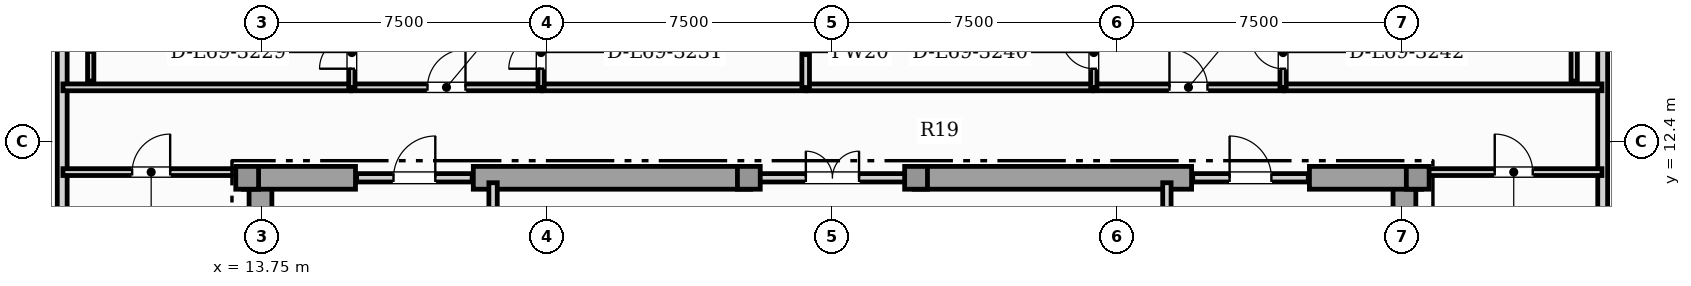
"""IFC4 building model, lengths in metres.
Left out: names, types, materials, properties, quantities, classifications, styles, units other than length and angle.
Written with IfcOpenShell. Run it as: python <this file> out.ifc"""

import sys

from ifc_helpers import new_model, si_unit, direction, frame, frame_2d, origin, origin_2d, place, context, subcontext, project, spatial, rectangle, extrude, element, fill, save


model = new_model("IFC4")
c1 = context("Model", 3, precision=1e-05, world=origin(), true_north=direction((0.0, 1.0)))
c2 = subcontext(c1, "Body", "Model", "MODEL_VIEW")
j1 = project(units=[si_unit("LENGTHUNIT", "METRE"), si_unit("PLANEANGLEUNIT", "RADIAN")], contexts=[c1])
p1 = place(None, origin())
s1 = spatial("IfcSite", under=j1, at=p1, CompositionType="ELEMENT")
p2 = place(p1, origin())
s2 = spatial("IfcBuilding", under=s1, at=p2, CompositionType="ELEMENT")
p3 = place(p2, frame((0.0, 0.0, 281.05)))
s3 = spatial("IfcBuildingStorey", under=s2, at=p3, CompositionType="ELEMENT", Elevation=281.05)
for number, where, z_axis, x_axis in (
    (1, (13.7, 0.92, 0.0), (0.0, 0.0, 1.0), (0.0, 1.0, 0.0)),
    (2, (43.8, 0.92, 0.0), (0.0, 0.0, 1.0), (0.0, 1.0, 0.0)),
):
    element("IfcWall", number, at=place(p3, frame(where, z_axis=z_axis, x_axis=x_axis)), inside=s3, PredefinedType="SHEAR", context=c2, shape_type="SweptSolid", body=[
        extrude(rectangle(XDim=10.53, YDim=0.6, at=frame_2d((5.265, 0.0))), origin(), (0.0, 0.0, 1.0), 3.65),
    ])
p4 = place(p3, frame((13.25, 11.45, 0.0), z_axis=(0.0, 0.0, 1.0), x_axis=(1.0, 0.0, 0.0)))
e3 = element("IfcWall", 3, at=p4, inside=s3, PredefinedType="SHEAR", context=c2, shape_type="SweptSolid", body=[
    extrude(rectangle(XDim=2.95, YDim=0.6, at=frame_2d((1.475, 0.0))), origin(), (0.0, 0.0, 1.0), 3.65),
])
for number, where, z_axis, x_axis in (
    (4, (19.3, 11.45, 0.0), (0.0, 0.0, 1.0), (1.0, 0.0, 0.0)),
    (5, (30.9, 11.45, 0.0), (0.0, 0.0, 1.0), (1.0, 0.0, 0.0)),
):
    element("IfcWall", number, at=place(p3, frame(where, z_axis=z_axis, x_axis=x_axis)), inside=s3, PredefinedType="SHEAR", context=c2, shape_type="SweptSolid", body=[
        extrude(rectangle(XDim=7.3, YDim=0.6, at=frame_2d((3.65, 0.0))), origin(), (0.0, 0.0, 1.0), 3.65),
    ])
p5 = place(p3, frame((41.3, 11.45, 0.0), z_axis=(0.0, 0.0, 1.0), x_axis=(1.0, 0.0, 0.0)))
e6 = element("IfcWall", 6, at=p5, inside=s3, PredefinedType="SHEAR", context=c2, shape_type="SweptSolid", body=[
    extrude(rectangle(XDim=2.95, YDim=0.6, at=frame_2d((1.475, 0.0))), origin(), (0.0, 0.0, 1.0), 3.65),
])
for number, where, z_axis, x_axis in (
    (7, (13.35, 11.45, 0.0), (0.0, 0.0, 1.0), (1.0, 0.0, 0.0)),
    (8, (44.15, 11.45, 0.0), (0.0, 0.0, 1.0), (1.0, 0.0, 0.0)),
    (9, (26.55, 11.45, 0.0), (0.0, 0.0, 1.0), (1.0, 0.0, 0.0)),
    (10, (30.95, 11.45, 0.0), (0.0, 0.0, 1.0), (1.0, 0.0, 0.0)),
):
    element("IfcColumn", number, at=place(p3, frame(where, z_axis=z_axis, x_axis=x_axis)), inside=s3, PredefinedType="COLUMN", context=c2, shape_type="SweptSolid", body=[
        extrude(rectangle(XDim=0.6, YDim=0.6, at=origin_2d()), origin(), (0.0, 0.0, 1.0), 3.85),
    ])
p6 = place(p3, frame((49.017, 3.24, 0.0), z_axis=(0.0, 0.0, 1.0), x_axis=(0.0, 1.0, 0.0)))
e11 = element("IfcWall", 11, at=p6, inside=s3, PredefinedType="SOLIDWALL", context=c2, shape_type="SweptSolid", body=[
    extrude(rectangle(XDim=14.836, YDim=0.26, at=frame_2d((7.418, 0.0))), origin(), (0.0, 0.0, 1.0), 3.65),
])
p7 = place(p3, frame((8.483, 18.076, 0.0), z_axis=(0.0, 0.0, 1.0), x_axis=(0.0, -1.0, 0.0)))
e12 = element("IfcWall", 12, at=p7, inside=s3, PredefinedType="SOLIDWALL", context=c2, shape_type="SweptSolid", body=[
    extrude(rectangle(XDim=14.836, YDim=0.26, at=frame_2d((7.418, 0.0))), origin(), (0.0, 0.0, 1.0), 3.65),
])
p8 = place(p7, frame((8.936, 0.0, 0.85)))
e13 = element("IfcOpeningElement", 13, at=p8, cuts=e12, PredefinedType="OPENING", context=c2, shape_type="SweptSolid", body=[
    extrude(rectangle(XDim=2.1, YDim=2.05, at=frame_2d((1.05, 1.025))), frame((0.0, 0.14, 0.0), z_axis=(0.0, -1.0, 0.0), x_axis=(1.0, 0.0, 0.0)), (0.0, 0.0, 1.0), 0.28),
])
p9 = place(p3, frame((19.82, 8.52, 0.0), z_axis=(0.0, 0.0, 1.0), x_axis=(0.0, 1.0, 0.0)))
e14 = element("IfcWall", 14, at=p9, inside=s3, PredefinedType="SOLIDWALL", context=c2, shape_type="SweptSolid", body=[
    extrude(rectangle(XDim=2.8, YDim=0.22, at=frame_2d((1.4, 0.0))), origin(), (0.0, 0.0, 1.0), 3.105),
])
p10 = place(p9, frame((0.85, 0.0, 0.0)))
e15 = element("IfcOpeningElement", 15, at=p10, cuts=e14, PredefinedType="OPENING", context=c2, shape_type="SweptSolid", body=[
    extrude(rectangle(XDim=1.1, YDim=2.2, at=frame_2d((0.55, 1.1))), frame((0.0, 0.12, 0.0), z_axis=(0.0, -1.0, 0.0), x_axis=(1.0, 0.0, 0.0)), (0.0, 0.0, 1.0), 0.24),
])
p11 = place(p3, frame((37.55, 8.52, 0.0), z_axis=(0.0, 0.0, 1.0), x_axis=(0.0, 1.0, 0.0)))
e16 = element("IfcWall", 16, at=p11, inside=s3, PredefinedType="SOLIDWALL", context=c2, shape_type="SweptSolid", body=[
    extrude(rectangle(XDim=2.8, YDim=0.22, at=frame_2d((1.4, 0.0))), origin(), (0.0, 0.0, 1.0), 3.105),
])
p12 = place(p11, frame((0.85, 0.0, 0.0)))
e17 = element("IfcOpeningElement", 17, at=p12, cuts=e16, PredefinedType="OPENING", context=c2, shape_type="SweptSolid", body=[
    extrude(rectangle(XDim=1.1, YDim=2.2, at=frame_2d((0.55, 1.1))), frame((0.0, 0.12, 0.0), z_axis=(0.0, -1.0, 0.0), x_axis=(1.0, 0.0, 0.0)), (0.0, 0.0, 1.0), 0.24),
])
p13 = place(p3, frame((16.23, 11.45, 0.0), z_axis=(0.0, 0.0, 1.0), x_axis=(1.0, 0.0, 0.0)))
e18 = element("IfcWall", 18, at=p13, inside=s3, PredefinedType="SOLIDWALL", context=c2, shape_type="SweptSolid", body=[
    extrude(rectangle(XDim=3.04, YDim=0.22, at=frame_2d((1.52, 0.0))), origin(), (0.0, 0.0, 1.0), 3.65),
])
p14 = place(p13, frame((0.97, 0.0, 0.0)))
e19 = element("IfcOpeningElement", 19, at=p14, cuts=e18, PredefinedType="OPENING", context=c2, shape_type="SweptSolid", body=[
    extrude(rectangle(XDim=1.1, YDim=2.2, at=frame_2d((0.55, 1.1))), frame((0.0, 0.12, 0.0), z_axis=(0.0, -1.0, 0.0), x_axis=(1.0, 0.0, 0.0)), (0.0, 0.0, 1.0), 0.24),
])
p15 = place(p3, frame((26.63, 11.45, 0.0), z_axis=(0.0, 0.0, 1.0), x_axis=(1.0, 0.0, 0.0)))
e20 = element("IfcWall", 20, at=p15, inside=s3, PredefinedType="SOLIDWALL", context=c2, shape_type="SweptSolid", body=[
    extrude(rectangle(XDim=4.24, YDim=0.22, at=frame_2d((2.12, 0.0))), origin(), (0.0, 0.0, 1.0), 3.65),
])
p16 = place(p15, frame((1.42, 0.0, 0.0)))
e21 = element("IfcOpeningElement", 21, at=p16, cuts=e20, PredefinedType="OPENING", context=c2, shape_type="SweptSolid", body=[
    extrude(rectangle(XDim=1.4, YDim=2.2, at=frame_2d((0.7, 1.1))), frame((0.0, 0.12, 0.0), z_axis=(0.0, -1.0, 0.0), x_axis=(1.0, 0.0, 0.0)), (0.0, 0.0, 1.0), 0.24),
])
p17 = place(p3, frame((38.23, 11.45, 0.0), z_axis=(0.0, 0.0, 1.0), x_axis=(1.0, 0.0, 0.0)))
e22 = element("IfcWall", 22, at=p17, inside=s3, PredefinedType="SOLIDWALL", context=c2, shape_type="SweptSolid", body=[
    extrude(rectangle(XDim=3.04, YDim=0.22, at=frame_2d((1.52, 0.0))), origin(), (0.0, 0.0, 1.0), 3.65),
])
p18 = place(p17, frame((0.97, 0.0, 0.0)))
e23 = element("IfcOpeningElement", 23, at=p18, cuts=e22, PredefinedType="OPENING", context=c2, shape_type="SweptSolid", body=[
    extrude(rectangle(XDim=1.1, YDim=2.2, at=frame_2d((0.55, 1.1))), frame((0.0, 0.12, 0.0), z_axis=(0.0, -1.0, 0.0), x_axis=(1.0, 0.0, 0.0)), (0.0, 0.0, 1.0), 0.24),
])
p19 = place(p3, frame((8.503, 11.6, 0.0), z_axis=(0.0, 0.0, 1.0), x_axis=(1.0, 0.0, 0.0)))
e24 = element("IfcWall", 24, at=p19, inside=s3, PredefinedType="PARTITIONING", context=c2, shape_type="SweptSolid", body=[
    extrude(rectangle(XDim=4.642, YDim=0.18, at=frame_2d((2.321, 0.0))), origin(), (0.0, 0.0, 1.0), 3.65),
])
p20 = place(p19, frame((1.821, 0.0, 0.0)))
e25 = element("IfcOpeningElement", 25, at=p20, cuts=e24, PredefinedType="OPENING", context=c2, shape_type="SweptSolid", body=[
    extrude(rectangle(XDim=1.0, YDim=2.15, at=frame_2d((0.5, 1.075))), frame((0.0, 0.1, 0.0), z_axis=(0.0, -1.0, 0.0), x_axis=(1.0, 0.0, 0.0)), (0.0, 0.0, 1.0), 0.2),
])
p21 = place(p3, frame((44.355, 11.6, 0.0), z_axis=(0.0, 0.0, 1.0), x_axis=(1.0, 0.0, 0.0)))
e26 = element("IfcWall", 26, at=p21, inside=s3, PredefinedType="PARTITIONING", context=c2, shape_type="SweptSolid", body=[
    extrude(rectangle(XDim=4.642, YDim=0.18, at=frame_2d((2.321, 0.0))), origin(), (0.0, 0.0, 1.0), 3.65),
])
p22 = place(p21, frame((1.821, 0.0, 0.0)))
e27 = element("IfcOpeningElement", 27, at=p22, cuts=e26, PredefinedType="OPENING", context=c2, shape_type="SweptSolid", body=[
    extrude(rectangle(XDim=1.0, YDim=2.15, at=frame_2d((0.5, 1.075))), frame((0.0, 0.1, 0.0), z_axis=(0.0, -1.0, 0.0), x_axis=(1.0, 0.0, 0.0)), (0.0, 0.0, 1.0), 0.2),
])
p23 = place(p3, frame((16.099, 13.83, 0.0), z_axis=(0.0, 0.0, 1.0), x_axis=(1.0, 0.0, 0.0)))
e28 = element("IfcWall", 28, at=p23, inside=s3, PredefinedType="PARTITIONING", context=c2, shape_type="SweptSolid", body=[
    extrude(rectangle(XDim=4.99, YDim=0.18, at=frame_2d((2.495, 0.0))), origin(), (0.0, 0.0, 1.0), 3.65),
])
p24 = place(p23, frame((1.995, 0.0, 0.0)))
e29 = element("IfcOpeningElement", 29, at=p24, cuts=e28, PredefinedType="OPENING", context=c2, shape_type="SweptSolid", body=[
    extrude(rectangle(XDim=1.0, YDim=2.15, at=frame_2d((0.5, 1.075))), frame((0.0, 0.1, 0.0), z_axis=(0.0, -1.0, 0.0), x_axis=(1.0, 0.0, 0.0)), (0.0, 0.0, 1.0), 0.2),
])
p25 = place(p3, frame((8.503, 13.83, 0.0), z_axis=(0.0, 0.0, 1.0), x_axis=(1.0, 0.0, 0.0)))
e30 = element("IfcWall", 30, at=p25, inside=s3, PredefinedType="PARTITIONING", context=c2, shape_type="SweptSolid", body=[
    extrude(rectangle(XDim=7.567, YDim=0.18, at=frame_2d((3.783, 0.0))), origin(), (0.0, 0.0, 1.0), 3.65),
])
p26 = place(p3, frame((21.119, 13.83, 0.0), z_axis=(0.0, 0.0, 1.0), x_axis=(1.0, 0.0, 0.0)))
e31 = element("IfcWall", 31, at=p26, inside=s3, PredefinedType="PARTITIONING", context=c2, shape_type="SweptSolid", body=[
    extrude(rectangle(XDim=6.931, YDim=0.18, at=frame_2d((3.465, 0.0))), origin(), (0.0, 0.0, 1.0), 3.65),
])
p27 = place(p3, frame((35.622, 13.83, 0.0), z_axis=(0.0, 0.0, 1.0), x_axis=(1.0, 0.0, 0.0)))
e32 = element("IfcWall", 32, at=p27, inside=s3, PredefinedType="PARTITIONING", context=c2, shape_type="SweptSolid", body=[
    extrude(rectangle(XDim=4.99, YDim=0.18, at=frame_2d((2.495, 0.0))), origin(), (0.0, 0.0, 1.0), 3.65),
])
p28 = place(p27, frame((1.995, 0.0, 0.0)))
e33 = element("IfcOpeningElement", 33, at=p28, cuts=e32, PredefinedType="OPENING", context=c2, shape_type="SweptSolid", body=[
    extrude(rectangle(XDim=1.0, YDim=2.15, at=frame_2d((0.5, 1.075))), frame((0.0, 0.1, 0.0), z_axis=(0.0, -1.0, 0.0), x_axis=(1.0, 0.0, 0.0)), (0.0, 0.0, 1.0), 0.2),
])
p29 = place(p3, frame((28.08, 13.83, 0.0), z_axis=(0.0, 0.0, 1.0), x_axis=(1.0, 0.0, 0.0)))
e34 = element("IfcWall", 34, at=p29, inside=s3, PredefinedType="PARTITIONING", context=c2, shape_type="SweptSolid", body=[
    extrude(rectangle(XDim=7.512, YDim=0.18, at=frame_2d((3.756, 0.0))), origin(), (0.0, 0.0, 1.0), 3.65),
])
p30 = place(p3, frame((40.642, 13.83, 0.0), z_axis=(0.0, 0.0, 1.0), x_axis=(1.0, 0.0, 0.0)))
e35 = element("IfcWall", 35, at=p30, inside=s3, PredefinedType="PARTITIONING", context=c2, shape_type="SweptSolid", body=[
    extrude(rectangle(XDim=8.355, YDim=0.18, at=frame_2d((4.177, 0.0))), origin(), (0.0, 0.0, 1.0), 3.65),
])
p31 = place(p3, frame((16.104, 13.825, 0.0), z_axis=(0.0, 0.0, 1.0), x_axis=(0.0, 1.0, 0.0)))
e36 = element("IfcWall", 36, at=p31, inside=s3, PredefinedType="PLUMBINGWALL", context=c2, shape_type="SweptSolid", body=[
    extrude(rectangle(XDim=1.84, YDim=0.165, at=frame_2d((0.92, 0.0))), origin(), (0.0, 0.0, 1.0), 3.65),
])
p32 = place(p31, frame((0.495, 0.0, 0.0)))
e37 = element("IfcOpeningElement", 37, at=p32, cuts=e36, PredefinedType="OPENING", context=c2, shape_type="SweptSolid", body=[
    extrude(rectangle(XDim=0.85, YDim=2.1, at=frame_2d((0.425, 1.05))), frame((0.0, 0.093, 0.0), z_axis=(0.0, -1.0, 0.0), x_axis=(1.0, 0.0, 0.0)), (0.0, 0.0, 1.0), 0.185),
])
p33 = place(p3, frame((21.084, 13.825, 0.0), z_axis=(0.0, 0.0, 1.0), x_axis=(0.0, 1.0, 0.0)))
e38 = element("IfcWall", 38, at=p33, inside=s3, PredefinedType="PLUMBINGWALL", context=c2, shape_type="SweptSolid", body=[
    extrude(rectangle(XDim=1.84, YDim=0.165, at=frame_2d((0.92, 0.0))), origin(), (0.0, 0.0, 1.0), 3.295),
])
p34 = place(p33, frame((0.495, 0.0, 0.0)))
e39 = element("IfcOpeningElement", 39, at=p34, cuts=e38, PredefinedType="OPENING", context=c2, shape_type="SweptSolid", body=[
    extrude(rectangle(XDim=0.85, YDim=2.1, at=frame_2d((0.425, 1.05))), frame((0.0, 0.093, 0.0), z_axis=(0.0, -1.0, 0.0), x_axis=(1.0, 0.0, 0.0)), (0.0, 0.0, 1.0), 0.185),
])
p35 = place(p3, frame((28.045, 13.825, 0.0), z_axis=(0.0, 0.0, 1.0), x_axis=(0.0, 1.0, 0.0)))
e40 = element("IfcWall", 40, at=p35, inside=s3, PredefinedType="PARTITIONING", context=c2, shape_type="SweptSolid", body=[
    extrude(rectangle(XDim=1.84, YDim=0.2, at=frame_2d((0.92, 0.0))), origin(), (0.0, 0.0, 1.0), 3.65),
])
p36 = place(p3, frame((35.627, 13.825, 0.0), z_axis=(0.0, 0.0, 1.0), x_axis=(0.0, 1.0, 0.0)))
e41 = element("IfcWall", 41, at=p36, inside=s3, PredefinedType="PLUMBINGWALL", context=c2, shape_type="SweptSolid", body=[
    extrude(rectangle(XDim=1.84, YDim=0.165, at=frame_2d((0.92, 0.0))), origin(), (0.0, 0.0, 1.0), 3.65),
])
p37 = place(p36, frame((0.495, 0.0, 0.0)))
e42 = element("IfcOpeningElement", 42, at=p37, cuts=e41, PredefinedType="OPENING", context=c2, shape_type="SweptSolid", body=[
    extrude(rectangle(XDim=0.85, YDim=2.1, at=frame_2d((0.425, 1.05))), frame((0.0, 0.093, 0.0), z_axis=(0.0, -1.0, 0.0), x_axis=(1.0, 0.0, 0.0)), (0.0, 0.0, 1.0), 0.185),
])
p38 = place(p3, frame((40.607, 13.825, 0.0), z_axis=(0.0, 0.0, 1.0), x_axis=(0.0, 1.0, 0.0)))
e43 = element("IfcWall", 43, at=p38, inside=s3, PredefinedType="PLUMBINGWALL", context=c2, shape_type="SweptSolid", body=[
    extrude(rectangle(XDim=1.84, YDim=0.165, at=frame_2d((0.92, 0.0))), origin(), (0.0, 0.0, 1.0), 3.65),
])
p39 = place(p38, frame((0.495, 0.0, 0.0)))
e44 = element("IfcOpeningElement", 44, at=p39, cuts=e43, PredefinedType="OPENING", context=c2, shape_type="SweptSolid", body=[
    extrude(rectangle(XDim=0.85, YDim=2.1, at=frame_2d((0.425, 1.05))), frame((0.0, 0.093, 0.0), z_axis=(0.0, -1.0, 0.0), x_axis=(1.0, 0.0, 0.0)), (0.0, 0.0, 1.0), 0.185),
])
p40 = place(p3, frame((9.233, 13.995, 0.0), z_axis=(0.0, 0.0, 1.0), x_axis=(0.0, 1.0, 0.0)))
e45 = element("IfcWall", 45, at=p40, inside=s3, PredefinedType="PLUMBINGWALL", context=c2, shape_type="SweptSolid", body=[
    extrude(rectangle(XDim=1.67, YDim=0.165, at=frame_2d((0.835, 0.0))), origin(), (0.0, 0.0, 1.0), 3.65),
])
p41 = place(p3, frame((48.267, 15.495, 0.0), z_axis=(0.0, 0.0, 1.0), x_axis=(0.0, -1.0, 0.0)))
e46 = element("IfcWall", 46, at=p41, inside=s3, PredefinedType="PLUMBINGWALL", context=c2, shape_type="SweptSolid", body=[
    extrude(rectangle(XDim=1.5, YDim=0.165, at=frame_2d((0.75, 0.0))), origin(), (0.0, 0.0, 1.0), 3.65),
])
p42 = place(p14, origin())
e47 = element("IfcDoor", 47, at=p42, inside=s3, OperationType="SINGLE_SWING_RIGHT", PredefinedType="DOOR", context=c2, shape_type="SweptSolid", body=[
    extrude(rectangle(XDim=1.1, YDim=2.2, at=frame_2d((0.55, 1.1))), frame((0.0, 0.025, 0.0), z_axis=(0.0, -1.0, 0.0), x_axis=(1.0, 0.0, 0.0)), (0.0, 0.0, 1.0), 0.05),
])
fill(e19, e47)
p43 = place(p16, origin())
e48 = element("IfcDoor", 48, at=p43, inside=s3, OperationType="DOUBLE_DOOR_SINGLE_SWING", PredefinedType="DOOR", context=c2, shape_type="SweptSolid", body=[
    extrude(rectangle(XDim=1.4, YDim=2.2, at=frame_2d((0.7, 1.1))), frame((0.0, 0.025, 0.0), z_axis=(0.0, -1.0, 0.0), x_axis=(1.0, 0.0, 0.0)), (0.0, 0.0, 1.0), 0.05),
])
fill(e21, e48)
p44 = place(p18, origin())
e49 = element("IfcDoor", 49, at=p44, inside=s3, OperationType="SINGLE_SWING_LEFT", PredefinedType="DOOR", context=c2, shape_type="SweptSolid", body=[
    extrude(rectangle(XDim=1.1, YDim=2.2, at=frame_2d((0.55, 1.1))), frame((0.0, 0.025, 0.0), z_axis=(0.0, -1.0, 0.0), x_axis=(1.0, 0.0, 0.0)), (0.0, 0.0, 1.0), 0.05),
])
fill(e23, e49)
p45 = place(p20, origin())
e50 = element("IfcDoor", 50, at=p45, inside=s3, OperationType="SINGLE_SWING_RIGHT", PredefinedType="DOOR", context=c2, shape_type="SweptSolid", body=[
    extrude(rectangle(XDim=1.0, YDim=2.15, at=frame_2d((0.5, 1.075))), frame((0.0, 0.025, 0.0), z_axis=(0.0, -1.0, 0.0), x_axis=(1.0, 0.0, 0.0)), (0.0, 0.0, 1.0), 0.05),
])
fill(e25, e50)
p46 = place(p22, origin())
e51 = element("IfcDoor", 51, at=p46, inside=s3, OperationType="SINGLE_SWING_LEFT", PredefinedType="DOOR", context=c2, shape_type="SweptSolid", body=[
    extrude(rectangle(XDim=1.0, YDim=2.15, at=frame_2d((0.5, 1.075))), frame((0.0, 0.025, 0.0), z_axis=(0.0, -1.0, 0.0), x_axis=(1.0, 0.0, 0.0)), (0.0, 0.0, 1.0), 0.05),
])
fill(e27, e51)
p47 = place(p24, origin())
e52 = element("IfcDoor", 52, at=p47, inside=s3, OperationType="SINGLE_SWING_RIGHT", PredefinedType="DOOR", context=c2, shape_type="SweptSolid", body=[
    extrude(rectangle(XDim=1.0, YDim=2.15, at=frame_2d((0.5, 1.075))), frame((0.0, 0.025, 0.0), z_axis=(0.0, -1.0, 0.0), x_axis=(1.0, 0.0, 0.0)), (0.0, 0.0, 1.0), 0.05),
])
fill(e29, e52)
p48 = place(p28, origin())
e53 = element("IfcDoor", 53, at=p48, inside=s3, OperationType="SINGLE_SWING_LEFT", PredefinedType="DOOR", context=c2, shape_type="SweptSolid", body=[
    extrude(rectangle(XDim=1.0, YDim=2.15, at=frame_2d((0.5, 1.075))), frame((0.0, 0.025, 0.0), z_axis=(0.0, -1.0, 0.0), x_axis=(1.0, 0.0, 0.0)), (0.0, 0.0, 1.0), 0.05),
])
fill(e33, e53)
p49 = place(p32, origin())
e54 = element("IfcDoor", 54, at=p49, inside=s3, OperationType="SINGLE_SWING_LEFT", PredefinedType="DOOR", context=c2, shape_type="SweptSolid", body=[
    extrude(rectangle(XDim=0.85, YDim=2.1, at=frame_2d((0.425, 1.05))), frame((0.0, 0.025, 0.0), z_axis=(0.0, -1.0, 0.0), x_axis=(1.0, 0.0, 0.0)), (0.0, 0.0, 1.0), 0.05),
])
fill(e37, e54)
p50 = place(p34, origin())
e55 = element("IfcDoor", 55, at=p50, inside=s3, OperationType="SINGLE_SWING_LEFT", PredefinedType="DOOR", context=c2, shape_type="SweptSolid", body=[
    extrude(rectangle(XDim=0.85, YDim=2.1, at=frame_2d((0.425, 1.05))), frame((0.0, 0.025, 0.0), z_axis=(0.0, -1.0, 0.0), x_axis=(1.0, 0.0, 0.0)), (0.0, 0.0, 1.0), 0.05),
])
fill(e39, e55)
p51 = place(p37, origin())
e56 = element("IfcDoor", 56, at=p51, inside=s3, OperationType="SINGLE_SWING_RIGHT", PredefinedType="DOOR", context=c2, shape_type="SweptSolid", body=[
    extrude(rectangle(XDim=0.85, YDim=2.1, at=frame_2d((0.425, 1.05))), frame((0.0, 0.025, 0.0), z_axis=(0.0, -1.0, 0.0), x_axis=(1.0, 0.0, 0.0)), (0.0, 0.0, 1.0), 0.05),
])
fill(e42, e56)
p52 = place(p39, origin())
e57 = element("IfcDoor", 57, at=p52, inside=s3, OperationType="SINGLE_SWING_RIGHT", PredefinedType="DOOR", context=c2, shape_type="SweptSolid", body=[
    extrude(rectangle(XDim=0.85, YDim=2.1, at=frame_2d((0.425, 1.05))), frame((0.0, 0.025, 0.0), z_axis=(0.0, -1.0, 0.0), x_axis=(1.0, 0.0, 0.0)), (0.0, 0.0, 1.0), 0.05),
])
fill(e44, e57)
save(model, sys.argv[1])
